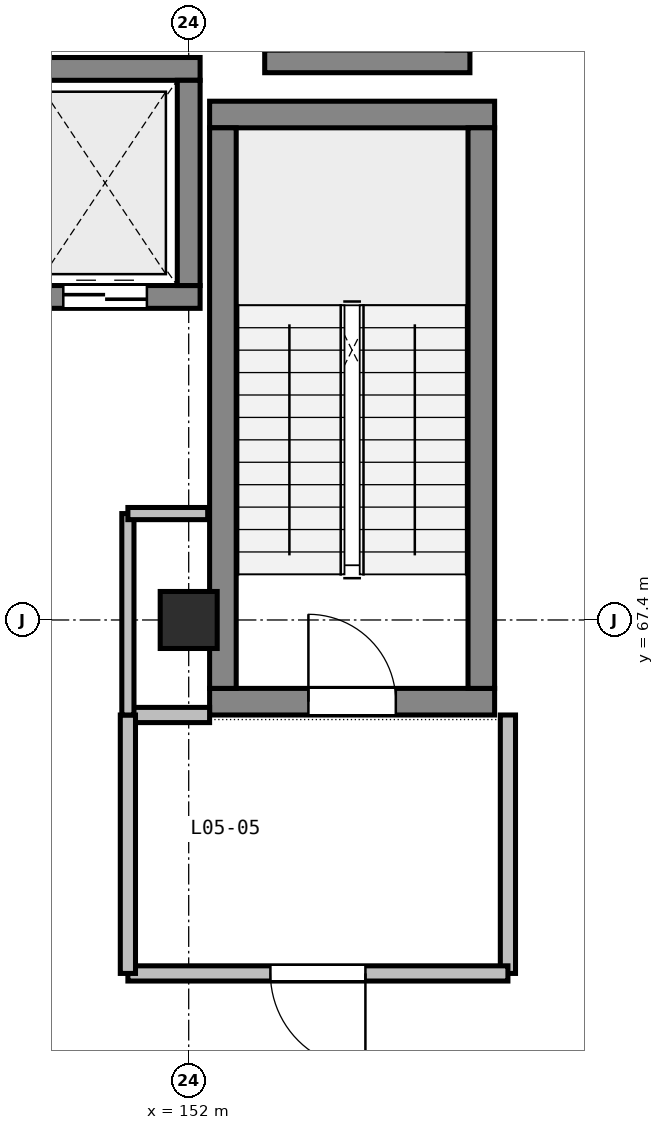
"""IFC4 building model, lengths in metres.
Left out: names, types, materials, properties, quantities, classifications, styles, units other than length and angle.
Written with IfcOpenShell. Run it as: python <this file> out.ifc"""

import sys

from ifc_helpers import new_model, si_unit, direction, frame, frame_2d, origin, origin_2d, place, context, subcontext, project, spatial, rectangle, extrude, element, fill, save


model = new_model("IFC4")
c1 = context("Model", 3, precision=1e-05, world=origin(), true_north=direction((0.0, 1.0)))
c2 = subcontext(c1, "Body", "Model", "MODEL_VIEW")
j1 = project(units=[si_unit("LENGTHUNIT", "METRE"), si_unit("PLANEANGLEUNIT", "RADIAN")], contexts=[c1])
p1 = place(None, origin())
s1 = spatial("IfcSite", under=j1, at=p1, CompositionType="ELEMENT")
p2 = place(p1, origin())
s2 = spatial("IfcBuilding", under=s1, at=p2, CompositionType="ELEMENT")
p3 = place(p2, frame((0.0, 0.0, 24.0)))
s3 = spatial("IfcBuildingStorey", under=s2, at=p3, CompositionType="ELEMENT", Elevation=24.0)
p4 = place(p3, frame((152.0, 67.4, 0.0), z_axis=(0.0, 0.0, 1.0), x_axis=(1.0, 0.0, 0.0)))
e1 = element("IfcColumn", 1, at=p4, inside=s3, PredefinedType="COLUMN", context=c2, shape_type="SweptSolid", body=[
    extrude(rectangle(XDim=0.75, YDim=0.75, at=origin_2d()), origin(), (0.0, 0.0, 1.0), 4.5),
])
p5 = place(p3, frame((152.275, 66.325, 0.0), z_axis=(0.0, 0.0, 1.0), x_axis=(1.0, 0.0, 0.0)))
e2 = element("IfcWall", 2, at=p5, inside=s3, PredefinedType="SHEAR", context=c2, shape_type="SweptSolid", body=[
    extrude(rectangle(XDim=3.75, YDim=0.35, at=frame_2d((1.875, 0.0))), origin(), (0.0, 0.0, 1.0), 4.5),
])
p6 = place(p5, frame((1.3, 0.0, 0.0)))
e3 = element("IfcOpeningElement", 3, at=p6, cuts=e2, PredefinedType="OPENING", context=c2, shape_type="SweptSolid", body=[
    extrude(rectangle(XDim=1.15, YDim=2.15, at=frame_2d((0.575, 1.075))), frame((0.0, 0.185, 0.0), z_axis=(0.0, -1.0, 0.0), x_axis=(1.0, 0.0, 0.0)), (0.0, 0.0, 1.0), 0.37),
])
p7 = place(p3, frame((152.275, 74.05, 0.0), z_axis=(0.0, 0.0, 1.0), x_axis=(1.0, 0.0, 0.0)))
e4 = element("IfcWall", 4, at=p7, inside=s3, PredefinedType="SHEAR", context=c2, shape_type="SweptSolid", body=[
    extrude(rectangle(XDim=3.75, YDim=0.35, at=frame_2d((1.875, 0.0))), origin(), (0.0, 0.0, 1.0), 4.5),
])
for number, where, z_axis, x_axis in (
    (5, (152.45, 66.5, 0.0), (0.0, 0.0, 1.0), (0.0, 1.0, 0.0)),
    (6, (155.85, 66.5, 0.0), (0.0, 0.0, 1.0), (0.0, 1.0, 0.0)),
):
    element("IfcWall", number, at=place(p3, frame(where, z_axis=z_axis, x_axis=x_axis)), inside=s3, PredefinedType="SHEAR", context=c2, shape_type="SweptSolid", body=[
        extrude(rectangle(XDim=7.375, YDim=0.35, at=frame_2d((3.688, 0.0))), origin(), (0.0, 0.0, 1.0), 4.5),
    ])
p8 = place(p3, frame((149.65, 71.65, 0.0), z_axis=(0.0, 0.0, 1.0), x_axis=(1.0, 0.0, 0.0)))
e7 = element("IfcWall", 7, at=p8, inside=s3, PredefinedType="SHEAR", context=c2, shape_type="SweptSolid", body=[
    extrude(rectangle(XDim=2.5, YDim=0.3, at=frame_2d((1.25, 0.0))), origin(), (0.0, 0.0, 1.0), 4.5),
])
p9 = place(p8, frame((0.7, 0.0, 0.0)))
e8 = element("IfcOpeningElement", 8, at=p9, cuts=e7, PredefinedType="OPENING", context=c2, shape_type="SweptSolid", body=[
    extrude(rectangle(XDim=1.1, YDim=2.1, at=frame_2d((0.55, 1.05))), frame((0.0, 0.16, 0.0), z_axis=(0.0, -1.0, 0.0), x_axis=(1.0, 0.0, 0.0)), (0.0, 0.0, 1.0), 0.32),
])
p10 = place(p3, frame((149.65, 74.65, 0.0), z_axis=(0.0, 0.0, 1.0), x_axis=(1.0, 0.0, 0.0)))
e9 = element("IfcWall", 9, at=p10, inside=s3, PredefinedType="SHEAR", context=c2, shape_type="SweptSolid", body=[
    extrude(rectangle(XDim=2.5, YDim=0.3, at=frame_2d((1.25, 0.0))), origin(), (0.0, 0.0, 1.0), 4.5),
])
for number, where, z_axis, x_axis in (
    (10, (152.0, 71.8, 0.0), (0.0, 0.0, 1.0), (0.0, 1.0, 0.0)),
    (11, (153.0, 74.75, 0.0), (0.0, 0.0, 1.0), (1.0, 0.0, 0.0)),
):
    element("IfcWall", number, at=place(p3, frame(where, z_axis=z_axis, x_axis=x_axis)), inside=s3, PredefinedType="SHEAR", context=c2, shape_type="SweptSolid", body=[
        extrude(rectangle(XDim=2.7, YDim=0.3, at=frame_2d((1.35, 0.0))), origin(), (0.0, 0.0, 1.0), 4.5),
    ])
p11 = place(p3, frame((151.2, 66.15, 0.0), z_axis=(0.0, 0.0, 1.0), x_axis=(1.0, 0.0, 0.0)))
e12 = element("IfcWall", 12, at=p11, inside=s3, PredefinedType="PARTITIONING", context=c2, shape_type="SweptSolid", body=[
    extrude(rectangle(XDim=1.075, YDim=0.2, at=frame_2d((0.538, 0.0))), origin(), (0.0, 0.0, 1.0), 3.735),
])
p12 = place(p3, frame((156.2, 66.15, 0.0), z_axis=(0.0, 0.0, 1.0), x_axis=(0.0, -1.0, 0.0)))
e13 = element("IfcWall", 13, at=p12, inside=s3, PredefinedType="PARTITIONING", context=c2, shape_type="SweptSolid", body=[
    extrude(rectangle(XDim=3.4, YDim=0.2, at=frame_2d((1.7, 0.0))), origin(), (0.0, 0.0, 1.0), 4.215),
])
p13 = place(p3, frame((156.2, 62.75, 0.0), z_axis=(0.0, 0.0, 1.0), x_axis=(-1.0, 0.0, 0.0)))
e14 = element("IfcWall", 14, at=p13, inside=s3, PredefinedType="PARTITIONING", context=c2, shape_type="SweptSolid", body=[
    extrude(rectangle(XDim=5.0, YDim=0.2, at=frame_2d((2.5, 0.0))), origin(), (0.0, 0.0, 1.0), 3.735),
])
p14 = place(p13, frame((1.875, 0.0, 0.0)))
e15 = element("IfcOpeningElement", 15, at=p14, cuts=e14, PredefinedType="OPENING", context=c2, shape_type="SweptSolid", body=[
    extrude(rectangle(XDim=1.25, YDim=2.15, at=frame_2d((0.625, 1.075))), frame((0.0, 0.11, 0.0), z_axis=(0.0, -1.0, 0.0), x_axis=(1.0, 0.0, 0.0)), (0.0, 0.0, 1.0), 0.22),
])
p15 = place(p3, frame((151.2, 62.75, 0.0), z_axis=(0.0, 0.0, 1.0), x_axis=(0.0, 1.0, 0.0)))
e16 = element("IfcWall", 16, at=p15, inside=s3, PredefinedType="PARTITIONING", context=c2, shape_type="SweptSolid", body=[
    extrude(rectangle(XDim=3.4, YDim=0.2, at=frame_2d((1.7, 0.0))), origin(), (0.0, 0.0, 1.0), 4.215),
])
p16 = place(p3, frame((151.2, 66.15, 0.0), z_axis=(0.0, 0.0, 1.0), x_axis=(0.0, 1.0, 0.0)))
e17 = element("IfcWall", 17, at=p16, inside=s3, PredefinedType="PARTITIONING", context=c2, shape_type="SweptSolid", body=[
    extrude(rectangle(XDim=2.65, YDim=0.16, at=frame_2d((1.325, 0.0))), origin(), (0.0, 0.0, 1.0), 3.885),
])
p17 = place(p3, frame((151.2, 68.8, 0.0), z_axis=(0.0, 0.0, 1.0), x_axis=(1.0, 0.0, 0.0)))
e18 = element("IfcWall", 18, at=p17, inside=s3, PredefinedType="PARTITIONING", context=c2, shape_type="SweptSolid", body=[
    extrude(rectangle(XDim=1.05, YDim=0.16, at=frame_2d((0.525, 0.0))), origin(), (0.0, 0.0, 1.0), 3.735),
])
p18 = place(p6, origin())
e19 = element("IfcDoor", 19, at=p18, inside=s3, OperationType="SINGLE_SWING_LEFT", PredefinedType="DOOR", context=c2, shape_type="SweptSolid", body=[
    extrude(rectangle(XDim=1.15, YDim=2.15, at=frame_2d((0.575, 1.075))), frame((0.0, 0.025, 0.0), z_axis=(0.0, -1.0, 0.0), x_axis=(1.0, 0.0, 0.0)), (0.0, 0.0, 1.0), 0.05),
])
fill(e3, e19)
p19 = place(p9, origin())
e20 = element("IfcDoor", 20, at=p19, inside=s3, OperationType="DOUBLE_DOOR_SLIDING", PredefinedType="DOOR", context=c2, shape_type="SweptSolid", body=[
    extrude(rectangle(XDim=1.1, YDim=2.1, at=frame_2d((0.55, 1.05))), frame((0.0, 0.025, 0.0), z_axis=(0.0, -1.0, 0.0), x_axis=(1.0, 0.0, 0.0)), (0.0, 0.0, 1.0), 0.05),
])
fill(e8, e20)
p20 = place(p14, origin())
e21 = element("IfcDoor", 21, at=p20, inside=s3, OperationType="SINGLE_SWING_LEFT", PredefinedType="DOOR", context=c2, shape_type="SweptSolid", body=[
    extrude(rectangle(XDim=1.25, YDim=2.15, at=frame_2d((0.625, 1.075))), frame((0.0, 0.025, 0.0), z_axis=(0.0, -1.0, 0.0), x_axis=(1.0, 0.0, 0.0)), (0.0, 0.0, 1.0), 0.05),
])
fill(e15, e21)
save(model, sys.argv[1])
